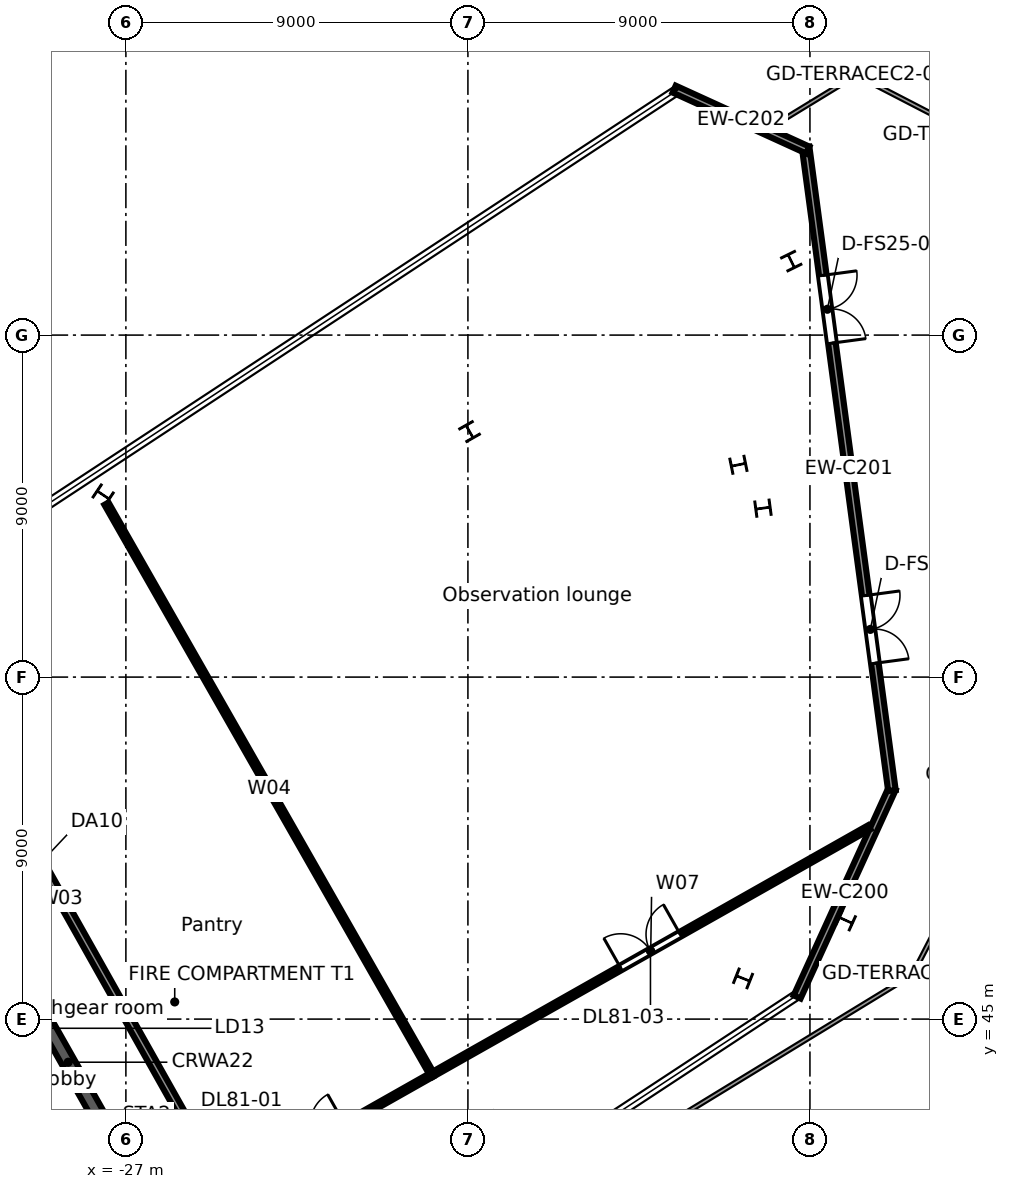
"""IFC4 building model, lengths in metres.
Left out: names, types, materials, properties, quantities, classifications, styles, units other than length and angle.
Written with IfcOpenShell. Run it as: python <this file> out.ifc"""

import sys

from ifc_helpers import new_model, si_unit, direction, frame, frame_2d, origin, origin_2d, place, context, subcontext, project, spatial, rectangle, i_section, extrude, element, fill, save


model = new_model("IFC4")
c1 = context("Model", 3, precision=1e-05, world=origin(), true_north=direction((0.0, 1.0)))
c2 = subcontext(c1, "Body", "Model", "MODEL_VIEW")
j1 = project(units=[si_unit("LENGTHUNIT", "METRE"), si_unit("PLANEANGLEUNIT", "RADIAN")], contexts=[c1])
p1 = place(None, origin())
s1 = spatial("IfcSite", under=j1, at=p1, CompositionType="ELEMENT")
p2 = place(p1, origin())
s2 = spatial("IfcBuilding", under=s1, at=p2, CompositionType="ELEMENT")
p3 = place(p2, frame((0.0, 0.0, 354.1)))
s3 = spatial("IfcBuildingStorey", under=s2, at=p3, CompositionType="ELEMENT", Elevation=354.1)
for number, where, z_axis, x_axis in (
    (1, (-8.058, 47.599, 0.0), (0.0, 0.0, 1.0), (0.415, 0.91, 0.0)),
    (2, (-10.237, 58.445, 0.0), (0.0, 0.0, 1.0), (-0.133, 0.991, 0.0)),
):
    element("IfcColumn", number, at=place(p3, frame(where, z_axis=z_axis, x_axis=x_axis)), inside=s3, PredefinedType="COLUMN", context=c2, shape_type="SweptSolid", body=[
        extrude(i_section(OverallWidth=0.4, OverallDepth=0.4, WebThickness=0.013, FlangeThickness=0.021, FilletRadius=0.022, at=origin_2d()), origin(), (0.0, 0.0, 1.0), 3.6),
    ])
for number, where, z_axis, x_axis in (
    (3, (-9.492, 64.947, -0.3), (0.0, 0.0, 1.0), (-0.898, -0.441, 0.0)),
    (4, (-17.957, 60.462, -0.3), (0.0, 0.0, 1.0), (0.87, 0.492, 0.0)),
    (5, (-27.598, 58.793, -0.3), (0.0, 0.0, 1.0), (0.558, 0.83, 0.0)),
):
    element("IfcColumn", number, at=place(p3, frame(where, z_axis=z_axis, x_axis=x_axis)), inside=s3, PredefinedType="COLUMN", context=c2, shape_type="SweptSolid", body=[
        extrude(i_section(OverallWidth=0.4, OverallDepth=0.4, WebThickness=0.013, FlangeThickness=0.021, FilletRadius=0.022, at=origin_2d()), origin(), (0.0, 0.0, 1.0), 3.9),
    ])
for number, where, z_axis, x_axis in (
    (6, (-10.76, 46.071, 0.0), (0.0, 0.0, 1.0), (0.369, 0.929, 0.0)),
    (7, (-10.882, 59.587, 0.0), (0.0, 0.0, 1.0), (-0.199, 0.98, 0.0)),
):
    element("IfcColumn", number, at=place(p3, frame(where, z_axis=z_axis, x_axis=x_axis)), inside=s3, PredefinedType="COLUMN", context=c2, shape_type="SweptSolid", body=[
        extrude(i_section(OverallWidth=0.4, OverallDepth=0.4, WebThickness=0.013, FlangeThickness=0.021, FilletRadius=0.022, at=origin_2d()), origin(), (0.0, 0.0, 1.0), 3.6),
    ])
p4 = place(p3, frame((-6.834, 51.069, 0.0), z_axis=(0.0, 0.0, 1.0), x_axis=(-0.415043982488, -0.909801347878, 0.0)))
e8 = element("IfcWall", 8, at=p4, inside=s3, PredefinedType="STANDARD", context=c2, shape_type="SweptSolid", body=[
    extrude(rectangle(XDim=6.031, YDim=0.2, at=frame_2d((3.015, 0.0))), origin(), (0.0, 0.0, 1.0), 2.7),
])
p5 = place(p3, frame((-9.114, 67.947, 0.0), z_axis=(0.0, 0.0, 1.0), x_axis=(0.132931254717, -0.991125260257, 0.0)))
e9 = element("IfcWall", 9, at=p5, inside=s3, PredefinedType="STANDARD", context=c2, shape_type="SweptSolid", body=[
    extrude(rectangle(XDim=17.084, YDim=0.2, at=frame_2d((8.542, 0.0))), origin(), (0.0, 0.0, 1.0), 3.3),
])
p6 = place(p5, frame((11.905, 0.0, 0.0)))
e10 = element("IfcOpeningElement", 10, at=p6, cuts=e9, PredefinedType="OPENING", context=c2, shape_type="SweptSolid", body=[
    extrude(rectangle(XDim=1.8, YDim=2.4, at=frame_2d((0.9, 1.2))), frame((0.0, 0.11, 0.0), z_axis=(0.0, -1.0, 0.0), x_axis=(1.0, 0.0, 0.0)), (0.0, 0.0, 1.0), 0.22),
])
p7 = place(p5, frame((3.405, 0.0, 0.0)))
e11 = element("IfcOpeningElement", 11, at=p7, cuts=e9, PredefinedType="OPENING", context=c2, shape_type="SweptSolid", body=[
    extrude(rectangle(XDim=1.8, YDim=2.4, at=frame_2d((0.9, 1.2))), frame((0.0, 0.11, 0.0), z_axis=(0.0, -1.0, 0.0), x_axis=(1.0, 0.0, 0.0)), (0.0, 0.0, 1.0), 0.22),
])
p8 = place(p3, frame((-12.573, 69.474, 0.0), z_axis=(0.0, 0.0, 1.0), x_axis=(0.909798966616, -0.415049202318, 0.0)))
e12 = element("IfcWall", 12, at=p8, inside=s3, PredefinedType="STANDARD", context=c2, shape_type="SweptSolid", body=[
    extrude(rectangle(XDim=3.866, YDim=0.2, at=frame_2d((1.933, 0.0))), origin(), (0.0, 0.0, 1.0), 3.3),
])
p9 = place(p3, frame((-31.792, 49.653, 0.0), z_axis=(0.0, 0.0, 1.0), x_axis=(0.492421943245, -0.870356610712, 0.0)))
e13 = element("IfcWall", 13, at=p9, inside=s3, PredefinedType="SOLIDWALL", context=c2, shape_type="SweptSolid", body=[
    extrude(rectangle(XDim=13.3, YDim=0.35, at=frame_2d((6.65, 0.0))), origin(), (0.0, 0.0, 1.0), 3.3),
])
p10 = place(p3, frame((-33.042, 55.86, 0.0), z_axis=(0.0, 0.0, 1.0), x_axis=(0.490288138745, -0.871560405828, 0.0)))
e14 = element("IfcWall", 14, at=p10, inside=s3, PredefinedType="PARTITIONING", context=c2, shape_type="SweptSolid", body=[
    extrude(rectangle(XDim=17.667, YDim=0.2, at=frame_2d((8.834, 0.0))), origin(), (0.0, 0.0, 1.0), 2.68),
])
p11 = place(p3, frame((-27.511, 58.564, 0.0), z_axis=(0.0, 0.0, 1.0), x_axis=(0.495459338806, -0.868631132063, 0.0)))
e15 = element("IfcWall", 15, at=p11, inside=s3, PredefinedType="PARTITIONING", context=c2, shape_type="SweptSolid", body=[
    extrude(rectangle(XDim=17.297, YDim=0.125, at=frame_2d((8.648, 0.0))), origin(), (0.0, 0.0, 1.0), 3.3),
])
p12 = place(p3, frame((-24.38, 40.462, 0.0), z_axis=(0.0, 0.0, 1.0), x_axis=(0.87036048388, 0.492415097353, 0.0)))
e16 = element("IfcWall", 16, at=p12, inside=s3, PredefinedType="PARTITIONING", context=c2, shape_type="SweptSolid", body=[
    extrude(rectangle(XDim=6.249, YDim=0.125, at=frame_2d((3.125, 0.0))), origin(), (0.0, 0.0, 1.0), 3.3),
])
p13 = place(p12, frame((2.7, 0.0, 0.0)))
e17 = element("IfcOpeningElement", 17, at=p13, cuts=e16, PredefinedType="OPENING", context=c2, shape_type="SweptSolid", body=[
    extrude(rectangle(XDim=0.9, YDim=2.1, at=frame_2d((0.45, 1.05))), frame((0.0, 0.073, 0.0), z_axis=(0.0, -1.0, 0.0), x_axis=(1.0, 0.0, 0.0)), (0.0, 0.0, 1.0), 0.145),
])
p14 = place(p3, frame((-18.941, 43.539, 0.0), z_axis=(0.0, 0.0, 1.0), x_axis=(0.870355301806, 0.492424256733, 0.0)))
e18 = element("IfcWall", 18, at=p14, inside=s3, PredefinedType="PARTITIONING", context=c2, shape_type="SweptSolid", body=[
    extrude(rectangle(XDim=13.216, YDim=0.125, at=frame_2d((6.608, 0.0))), origin(), (0.0, 0.0, 1.0), 2.68),
])
p15 = place(p14, frame((5.7, 0.0, 0.0)))
e19 = element("IfcOpeningElement", 19, at=p15, cuts=e18, PredefinedType="OPENING", context=c2, shape_type="SweptSolid", body=[
    extrude(rectangle(XDim=1.8, YDim=2.1, at=frame_2d((0.9, 1.05))), frame((0.0, 0.073, 0.0), z_axis=(0.0, -1.0, 0.0), x_axis=(1.0, 0.0, 0.0)), (0.0, 0.0, 1.0), 0.145),
])
p16 = place(p6, origin())
e20 = element("IfcDoor", 20, at=p16, inside=s3, OperationType="DOUBLE_DOOR_SINGLE_SWING", PredefinedType="DOOR", context=c2, shape_type="SweptSolid", body=[
    extrude(rectangle(XDim=1.8, YDim=2.4, at=frame_2d((0.9, 1.2))), frame((0.0, 0.025, 0.0), z_axis=(0.0, -1.0, 0.0), x_axis=(1.0, 0.0, 0.0)), (0.0, 0.0, 1.0), 0.05),
])
fill(e10, e20)
p17 = place(p7, origin())
e21 = element("IfcDoor", 21, at=p17, inside=s3, OperationType="DOUBLE_DOOR_SINGLE_SWING", PredefinedType="DOOR", context=c2, shape_type="SweptSolid", body=[
    extrude(rectangle(XDim=1.8, YDim=2.4, at=frame_2d((0.9, 1.2))), frame((0.0, 0.025, 0.0), z_axis=(0.0, -1.0, 0.0), x_axis=(1.0, 0.0, 0.0)), (0.0, 0.0, 1.0), 0.05),
])
fill(e11, e21)
p18 = place(p15, origin())
e22 = element("IfcDoor", 22, at=p18, inside=s3, OperationType="DOUBLE_DOOR_SINGLE_SWING", PredefinedType="DOOR", context=c2, shape_type="SweptSolid", body=[
    extrude(rectangle(XDim=1.8, YDim=2.1, at=frame_2d((0.9, 1.05))), frame((0.0, 0.025, 0.0), z_axis=(0.0, -1.0, 0.0), x_axis=(1.0, 0.0, 0.0)), (0.0, 0.0, 1.0), 0.05),
])
fill(e19, e22)
save(model, sys.argv[1])
